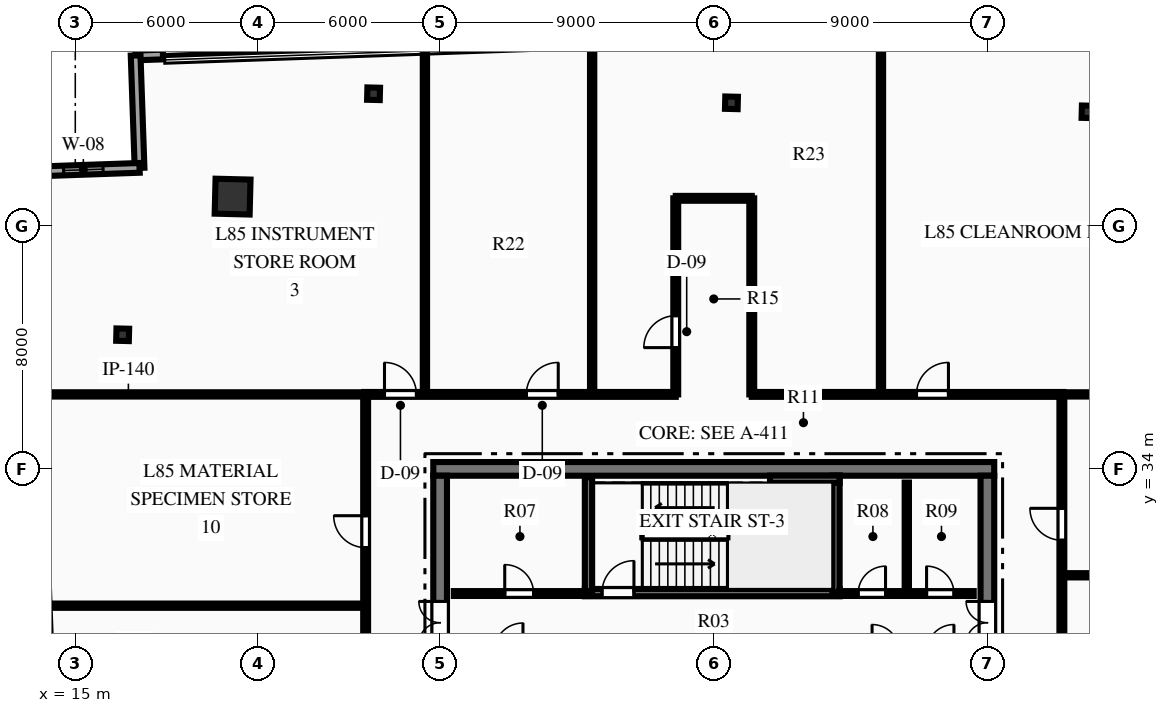
"""IFC4 building model, lengths in metres.
Left out: names, types, materials, properties, quantities, classifications, styles, units other than length and angle.
Written with IfcOpenShell. Run it as: python <this file> out.ifc"""

import sys

from ifc_helpers import new_model, si_unit, direction, frame, frame_2d, origin, origin_2d, place, context, subcontext, project, spatial, rectangle, hollow_rectangle, i_section, extrude, element, fill, save


model = new_model("IFC4")
c1 = context("Model", 3, precision=1e-05, world=origin(), true_north=direction((0.0, 1.0)))
c2 = subcontext(c1, "Body", "Model", "MODEL_VIEW")
j1 = project(units=[si_unit("LENGTHUNIT", "METRE"), si_unit("PLANEANGLEUNIT", "RADIAN")], contexts=[c1])
p1 = place(None, origin())
s1 = spatial("IfcSite", under=j1, at=p1, CompositionType="ELEMENT")
p2 = place(p1, origin())
s2 = spatial("IfcBuilding", under=s1, at=p2, CompositionType="ELEMENT")
p3 = place(p2, frame((0.0, 0.0, 336.45)))
s3 = spatial("IfcBuildingStorey", under=s2, at=p3, CompositionType="ELEMENT", Elevation=336.45)
p4 = place(p3, frame((26.775, 34.0, 0.0), z_axis=(0.0, 0.0, 1.0), x_axis=(1.0, 0.0, 0.0)))
e1 = element("IfcWall", 1, at=p4, inside=s3, PredefinedType="SHEAR", context=c2, shape_type="SweptSolid", body=[
    extrude(rectangle(XDim=18.45, YDim=0.45, at=frame_2d((9.225, 0.0))), origin(), (0.0, 0.0, 1.0), 3.75),
])
p5 = place(p3, frame((27.0, 18.225, 0.0), z_axis=(0.0, 0.0, 1.0), x_axis=(0.0, 1.0, 0.0)))
e2 = element("IfcWall", 2, at=p5, inside=s3, PredefinedType="SHEAR", context=c2, shape_type="SweptSolid", body=[
    extrude(rectangle(XDim=15.55, YDim=0.45, at=frame_2d((7.775, 0.0))), origin(), (0.0, 0.0, 1.0), 3.75),
])
p6 = place(p5, frame((10.015, 0.0, 0.0)))
e3 = element("IfcOpeningElement", 3, at=p6, cuts=e2, PredefinedType="OPENING", context=c2, shape_type="SweptSolid", body=[
    extrude(rectangle(XDim=1.4, YDim=2.2, at=frame_2d((0.7, 1.1))), frame((0.0, 0.235, 0.0), z_axis=(0.0, -1.0, 0.0), x_axis=(1.0, 0.0, 0.0)), (0.0, 0.0, 1.0), 0.47),
])
p7 = place(p3, frame((45.0, 18.225, 0.0), z_axis=(0.0, 0.0, 1.0), x_axis=(0.0, 1.0, 0.0)))
e4 = element("IfcWall", 4, at=p7, inside=s3, PredefinedType="SHEAR", context=c2, shape_type="SweptSolid", body=[
    extrude(rectangle(XDim=15.55, YDim=0.45, at=frame_2d((7.775, 0.0))), origin(), (0.0, 0.0, 1.0), 3.75),
])
p8 = place(p7, frame((10.015, 0.0, 0.0)))
e5 = element("IfcOpeningElement", 5, at=p8, cuts=e4, PredefinedType="OPENING", context=c2, shape_type="SweptSolid", body=[
    extrude(rectangle(XDim=1.4, YDim=2.2, at=frame_2d((0.7, 1.1))), frame((0.0, 0.235, 0.0), z_axis=(0.0, -1.0, 0.0), x_axis=(1.0, 0.0, 0.0)), (0.0, 0.0, 1.0), 0.47),
])
p9 = place(p3, frame((31.76, 29.93, 0.0), z_axis=(0.0, 0.0, 1.0), x_axis=(1.0, 0.0, 0.0)))
e6 = element("IfcWall", 6, at=p9, inside=s3, PredefinedType="SHEAR", context=c2, shape_type="SweptSolid", body=[
    extrude(rectangle(XDim=8.38, YDim=0.24, at=frame_2d((4.19, 0.0))), origin(), (0.0, 0.0, 1.0), 3.75),
])
p10 = place(p9, frame((0.565, 0.0, 0.0)))
e7 = element("IfcOpeningElement", 7, at=p10, cuts=e6, PredefinedType="OPENING", context=c2, shape_type="SweptSolid", body=[
    extrude(rectangle(XDim=1.05, YDim=2.15, at=frame_2d((0.525, 1.075))), frame((0.0, 0.13, 0.0), z_axis=(0.0, -1.0, 0.0), x_axis=(1.0, 0.0, 0.0)), (0.0, 0.0, 1.0), 0.26),
])
p11 = place(p3, frame((31.88, 29.93, 0.0), z_axis=(0.0, 0.0, 1.0), x_axis=(0.0, 1.0, 0.0)))
e8 = element("IfcWall", 8, at=p11, inside=s3, PredefinedType="SHEAR", context=c2, shape_type="SweptSolid", body=[
    extrude(rectangle(XDim=3.79, YDim=0.24, at=frame_2d((1.895, 0.0))), origin(), (0.0, 0.0, 1.0), 3.75),
])
p12 = place(p3, frame((40.02, 29.93, 0.0), z_axis=(0.0, 0.0, 1.0), x_axis=(0.0, 1.0, 0.0)))
e9 = element("IfcWall", 9, at=p12, inside=s3, PredefinedType="SHEAR", context=c2, shape_type="SweptSolid", body=[
    extrude(rectangle(XDim=3.85, YDim=0.24, at=frame_2d((1.925, 0.0))), origin(), (0.0, 0.0, 1.0), 3.75),
])
p13 = place(p3, frame((37.85, 33.66, 0.0), z_axis=(0.0, 0.0, 1.0), x_axis=(1.0, 0.0, 0.0)))
e10 = element("IfcWall", 10, at=p13, inside=s3, PredefinedType="SHEAR", context=c2, shape_type="SweptSolid", body=[
    extrude(rectangle(XDim=2.29, YDim=0.24, at=frame_2d((1.145, 0.0))), origin(), (0.0, 0.0, 1.0), 3.75),
])
p14 = place(p3, frame((20.174, 42.956, 0.0), z_axis=(0.0, 0.0, 1.0), x_axis=(0.025304572866, 0.999679788028, 0.0)))
e11 = element("IfcColumn", 11, at=p14, inside=s3, PredefinedType="COLUMN", context=c2, shape_type="SweptSolid", body=[
    extrude(hollow_rectangle(XDim=1.15, YDim=1.15, WallThickness=0.05, at=origin_2d()), origin(), (0.0, 0.0, 1.0), 3.75),
])
for number, where, z_axis, x_axis in (
    (12, (48.312, 45.745, 0.0), (0.0, 0.0, 1.0), (0.025, 1.0, 0.0)),
    (13, (36.582, 46.042, 0.0), (0.0, 0.0, 1.0), (0.025, 1.0, 0.0)),
    (14, (24.811, 46.34, 0.0), (0.0, 0.0, 1.0), (0.025, 1.0, 0.0)),
    (15, (16.558, 38.412, 0.0), (0.0, 0.0, 1.0), (0.025, 1.0, 0.0)),
):
    element("IfcColumn", number, at=place(p3, frame(where, z_axis=z_axis, x_axis=x_axis)), inside=s3, PredefinedType="COLUMN", context=c2, shape_type="SweptSolid", body=[
        extrude(i_section(OverallWidth=0.406, OverallDepth=0.416, WebThickness=0.03, FlangeThickness=0.048, at=origin_2d()), origin(), (0.0, 0.0, 1.0), 3.75),
    ])
p15 = place(p3, frame((16.985, 47.6, 0.0), z_axis=(0.0, 0.0, 1.0), x_axis=(0.999396943912, 0.034723889474, 0.0)))
e16 = element("IfcWall", 16, at=p15, inside=s3, PredefinedType="STANDARD", context=c2, shape_type="SweptSolid", body=[
    extrude(rectangle(XDim=0.9, YDim=0.32, at=frame_2d((0.45, 0.0))), origin(), (0.0, 0.0, 1.0), 3.49),
])
p16 = place(p3, frame((17.114, 43.902, 0.0), z_axis=(0.0, 0.0, 1.0), x_axis=(-0.034905429677, 0.999390619817, 0.0)))
e17 = element("IfcWall", 17, at=p16, inside=s3, PredefinedType="STANDARD", context=c2, shape_type="SweptSolid", body=[
    extrude(rectangle(XDim=3.7, YDim=0.32, at=frame_2d((1.85, 0.0))), origin(), (0.0, 0.0, 1.0), 3.49),
])
p17 = place(p3, frame((13.416, 43.773, 0.0), z_axis=(0.0, 0.0, 1.0), x_axis=(0.999390619817, 0.034905429677, 0.0)))
e18 = element("IfcWall", 18, at=p17, inside=s3, PredefinedType="STANDARD", context=c2, shape_type="SweptSolid", body=[
    extrude(rectangle(XDim=3.7, YDim=0.32, at=frame_2d((1.85, 0.0))), origin(), (0.0, 0.0, 1.0), 3.49),
])
p18 = place(p17, frame((1.2, 0.0, 0.85)))
e19 = element("IfcOpeningElement", 19, at=p18, cuts=e18, PredefinedType="OPENING", context=c2, shape_type="SweptSolid", body=[
    extrude(rectangle(XDim=1.3, YDim=1.9, at=frame_2d((0.65, 0.95))), frame((0.0, 0.17, 0.0), z_axis=(0.0, -1.0, 0.0), x_axis=(1.0, 0.0, 0.0)), (0.0, 0.0, 1.0), 0.34),
])
p19 = place(p3, frame((27.45, 29.9, 0.0), z_axis=(0.0, 0.0, 1.0), x_axis=(1.0, 0.0, 0.0)))
e20 = element("IfcWall", 20, at=p19, inside=s3, PredefinedType="PARTITIONING", context=c2, shape_type="SweptSolid", body=[
    extrude(rectangle(XDim=4.43, YDim=0.16, at=frame_2d((2.215, 0.0))), origin(), (0.0, 0.0, 1.0), 3.49),
])
p20 = place(p19, frame((1.675, 0.0, 0.0)))
e21 = element("IfcOpeningElement", 21, at=p20, cuts=e20, PredefinedType="OPENING", context=c2, shape_type="SweptSolid", body=[
    extrude(rectangle(XDim=0.95, YDim=2.15, at=frame_2d((0.475, 1.075))), frame((0.0, 0.09, 0.0), z_axis=(0.0, -1.0, 0.0), x_axis=(1.0, 0.0, 0.0)), (0.0, 0.0, 1.0), 0.18),
])
p21 = place(p3, frame((40.12, 29.9, 0.0), z_axis=(0.0, 0.0, 1.0), x_axis=(1.0, 0.0, 0.0)))
e22 = element("IfcWall", 22, at=p21, inside=s3, PredefinedType="PARTITIONING", context=c2, shape_type="SweptSolid", body=[
    extrude(rectangle(XDim=4.43, YDim=0.16, at=frame_2d((2.215, 0.0))), origin(), (0.0, 0.0, 1.0), 3.49),
])
p22 = place(p21, frame((0.63, 0.0, 0.0)))
e23 = element("IfcOpeningElement", 23, at=p22, cuts=e22, PredefinedType="OPENING", context=c2, shape_type="SweptSolid", body=[
    extrude(rectangle(XDim=0.9, YDim=2.15, at=frame_2d((0.45, 1.075))), frame((0.0, 0.09, 0.0), z_axis=(0.0, -1.0, 0.0), x_axis=(1.0, 0.0, 0.0)), (0.0, 0.0, 1.0), 0.18),
])
p23 = place(p21, frame((2.88, 0.0, 0.0)))
e24 = element("IfcOpeningElement", 24, at=p23, cuts=e22, PredefinedType="OPENING", context=c2, shape_type="SweptSolid", body=[
    extrude(rectangle(XDim=0.9, YDim=2.15, at=frame_2d((0.45, 1.075))), frame((0.0, 0.09, 0.0), z_axis=(0.0, -1.0, 0.0), x_axis=(1.0, 0.0, 0.0)), (0.0, 0.0, 1.0), 0.18),
])
p24 = place(p3, frame((42.35, 29.95, 0.0), z_axis=(0.0, 0.0, 1.0), x_axis=(0.0, 1.0, 0.0)))
e25 = element("IfcWall", 25, at=p24, inside=s3, PredefinedType="PARTITIONING", context=c2, shape_type="SweptSolid", body=[
    extrude(rectangle(XDim=3.6, YDim=0.14, at=frame_2d((1.8, 0.0))), origin(), (0.0, 0.0, 1.0), 3.49),
])
p25 = place(p3, frame((24.5, 36.45, 0.0), z_axis=(0.0, 0.0, 1.0), x_axis=(1.0, 0.0, 0.0)))
e26 = element("IfcWall", 26, at=p25, inside=s3, PredefinedType="PARTITIONING", context=c2, shape_type="SweptSolid", body=[
    extrude(rectangle(XDim=10.25, YDim=0.16, at=frame_2d((5.125, 0.0))), origin(), (0.0, 0.0, 1.0), 3.49),
])
p26 = place(p25, frame((0.67, 0.0, 0.0)))
e27 = element("IfcOpeningElement", 27, at=p26, cuts=e26, PredefinedType="OPENING", context=c2, shape_type="SweptSolid", body=[
    extrude(rectangle(XDim=1.05, YDim=2.15, at=frame_2d((0.525, 1.075))), frame((0.0, 0.09, 0.0), z_axis=(0.0, -1.0, 0.0), x_axis=(1.0, 0.0, 0.0)), (0.0, 0.0, 1.0), 0.18),
])
p27 = place(p25, frame((5.335, 0.0, 0.0)))
e28 = element("IfcOpeningElement", 28, at=p27, cuts=e26, PredefinedType="OPENING", context=c2, shape_type="SweptSolid", body=[
    extrude(rectangle(XDim=1.05, YDim=2.15, at=frame_2d((0.525, 1.075))), frame((0.0, 0.09, 0.0), z_axis=(0.0, -1.0, 0.0), x_axis=(1.0, 0.0, 0.0)), (0.0, 0.0, 1.0), 0.18),
])
p28 = place(p3, frame((37.25, 36.45, 0.0), z_axis=(0.0, 0.0, 1.0), x_axis=(1.0, 0.0, 0.0)))
e29 = element("IfcWall", 29, at=p28, inside=s3, PredefinedType="PARTITIONING", context=c2, shape_type="SweptSolid", body=[
    extrude(rectangle(XDim=10.25, YDim=0.16, at=frame_2d((5.125, 0.0))), origin(), (0.0, 0.0, 1.0), 3.49),
])
p29 = place(p28, frame((5.419, 0.0, 0.0)))
e30 = element("IfcOpeningElement", 30, at=p29, cuts=e29, PredefinedType="OPENING", context=c2, shape_type="SweptSolid", body=[
    extrude(rectangle(XDim=1.05, YDim=2.15, at=frame_2d((0.525, 1.075))), frame((0.0, 0.09, 0.0), z_axis=(0.0, -1.0, 0.0), x_axis=(1.0, 0.0, 0.0)), (0.0, 0.0, 1.0), 0.18),
])
p30 = place(p3, frame((24.55, 27.25, 0.0), z_axis=(0.0, 0.0, 1.0), x_axis=(0.0, 1.0, 0.0)))
e31 = element("IfcWall", 31, at=p30, inside=s3, PredefinedType="PARTITIONING", context=c2, shape_type="SweptSolid", body=[
    extrude(rectangle(XDim=9.2, YDim=0.16, at=frame_2d((4.6, 0.0))), origin(), (0.0, 0.0, 1.0), 3.49),
])
p31 = place(p30, frame((4.16, 0.0, 0.0)))
e32 = element("IfcOpeningElement", 32, at=p31, cuts=e31, PredefinedType="OPENING", context=c2, shape_type="SweptSolid", body=[
    extrude(rectangle(XDim=1.05, YDim=2.15, at=frame_2d((0.525, 1.075))), frame((0.0, 0.09, 0.0), z_axis=(0.0, -1.0, 0.0), x_axis=(1.0, 0.0, 0.0)), (0.0, 0.0, 1.0), 0.18),
])
p32 = place(p3, frame((47.45, 27.25, 0.0), z_axis=(0.0, 0.0, 1.0), x_axis=(0.0, 1.0, 0.0)))
e33 = element("IfcWall", 33, at=p32, inside=s3, PredefinedType="PARTITIONING", context=c2, shape_type="SweptSolid", body=[
    extrude(rectangle(XDim=9.2, YDim=0.16, at=frame_2d((4.6, 0.0))), origin(), (0.0, 0.0, 1.0), 3.49),
])
p33 = place(p32, frame((4.403, 0.0, 0.0)))
e34 = element("IfcOpeningElement", 34, at=p33, cuts=e33, PredefinedType="OPENING", context=c2, shape_type="SweptSolid", body=[
    extrude(rectangle(XDim=1.05, YDim=2.15, at=frame_2d((0.525, 1.075))), frame((0.0, 0.09, 0.0), z_axis=(0.0, -1.0, 0.0), x_axis=(1.0, 0.0, 0.0)), (0.0, 0.0, 1.0), 0.18),
])
p34 = place(p3, frame((34.75, 36.45, 0.0), z_axis=(0.0, 0.0, 1.0), x_axis=(0.0, 1.0, 0.0)))
e35 = element("IfcWall", 35, at=p34, inside=s3, PredefinedType="PARTITIONING", context=c2, shape_type="SweptSolid", body=[
    extrude(rectangle(XDim=6.45, YDim=0.16, at=frame_2d((3.225, 0.0))), origin(), (0.0, 0.0, 1.0), 3.49),
])
p35 = place(p34, frame((1.539, 0.0, 0.0)))
e36 = element("IfcOpeningElement", 36, at=p35, cuts=e35, PredefinedType="OPENING", context=c2, shape_type="SweptSolid", body=[
    extrude(rectangle(XDim=1.05, YDim=2.15, at=frame_2d((0.525, 1.075))), frame((0.0, 0.09, 0.0), z_axis=(0.0, -1.0, 0.0), x_axis=(1.0, 0.0, 0.0)), (0.0, 0.0, 1.0), 0.18),
])
p36 = place(p3, frame((37.25, 36.45, 0.0), z_axis=(0.0, 0.0, 1.0), x_axis=(0.0, 1.0, 0.0)))
e37 = element("IfcWall", 37, at=p36, inside=s3, PredefinedType="PARTITIONING", context=c2, shape_type="SweptSolid", body=[
    extrude(rectangle(XDim=6.45, YDim=0.16, at=frame_2d((3.225, 0.0))), origin(), (0.0, 0.0, 1.0), 3.49),
])
p37 = place(p3, frame((34.75, 42.9, 0.0), z_axis=(0.0, 0.0, 1.0), x_axis=(1.0, 0.0, 0.0)))
e38 = element("IfcWall", 38, at=p37, inside=s3, PredefinedType="PARTITIONING", context=c2, shape_type="SweptSolid", body=[
    extrude(rectangle(XDim=2.5, YDim=0.16, at=frame_2d((1.25, 0.0))), origin(), (0.0, 0.0, 1.0), 3.49),
])
p38 = place(p3, frame((13.712, 36.45, 0.0), z_axis=(0.0, 0.0, 1.0), x_axis=(1.0, 0.0, 0.0)))
e39 = element("IfcWall", 39, at=p38, inside=s3, PredefinedType="PARTITIONING", context=c2, shape_type="SweptSolid", body=[
    extrude(rectangle(XDim=10.838, YDim=0.14, at=frame_2d((5.419, 0.0))), origin(), (0.0, 0.0, 1.0), 2.868),
])
p39 = place(p3, frame((47.45, 36.45, 0.0), z_axis=(0.0, 0.0, 1.0), x_axis=(1.0, 0.0, 0.0)))
e40 = element("IfcWall", 40, at=p39, inside=s3, PredefinedType="PARTITIONING", context=c2, shape_type="SweptSolid", body=[
    extrude(rectangle(XDim=10.283, YDim=0.14, at=frame_2d((5.142, 0.0))), origin(), (0.0, 0.0, 1.0), 2.868),
])
p40 = place(p3, frame((26.5, 36.45, 0.0), z_axis=(0.0, 0.0, 1.0), x_axis=(0.0, 1.0, 0.0)))
e41 = element("IfcWall", 41, at=p40, inside=s3, PredefinedType="PARTITIONING", context=c2, shape_type="SweptSolid", body=[
    extrude(rectangle(XDim=11.442, YDim=0.14, at=frame_2d((5.721, 0.0))), origin(), (0.0, 0.0, 1.0), 2.868),
])
p41 = place(p3, frame((32.0, 36.45, 0.0), z_axis=(0.0, 0.0, 1.0), x_axis=(0.0, 1.0, 0.0)))
e42 = element("IfcWall", 42, at=p41, inside=s3, PredefinedType="PARTITIONING", context=c2, shape_type="SweptSolid", body=[
    extrude(rectangle(XDim=11.634, YDim=0.14, at=frame_2d((5.817, 0.0))), origin(), (0.0, 0.0, 1.0), 3.49),
])
p42 = place(p3, frame((41.5, 36.45, 0.0), z_axis=(0.0, 0.0, 1.0), x_axis=(0.0, 1.0, 0.0)))
e43 = element("IfcWall", 43, at=p42, inside=s3, PredefinedType="PARTITIONING", context=c2, shape_type="SweptSolid", body=[
    extrude(rectangle(XDim=11.966, YDim=0.14, at=frame_2d((5.983, 0.0))), origin(), (0.0, 0.0, 1.0), 3.49),
])
p43 = place(p3, frame((13.954, 29.5, 0.0), z_axis=(0.0, 0.0, 1.0), x_axis=(1.0, 0.0, 0.0)))
e44 = element("IfcWall", 44, at=p43, inside=s3, PredefinedType="PARTITIONING", context=c2, shape_type="SweptSolid", body=[
    extrude(rectangle(XDim=10.596, YDim=0.14, at=frame_2d((5.298, 0.0))), origin(), (0.0, 0.0, 1.0), 3.49),
])
p44 = place(p3, frame((47.45, 30.5, 0.0), z_axis=(0.0, 0.0, 1.0), x_axis=(1.0, 0.0, 0.0)))
e45 = element("IfcWall", 45, at=p44, inside=s3, PredefinedType="PARTITIONING", context=c2, shape_type="SweptSolid", body=[
    extrude(rectangle(XDim=10.491, YDim=0.14, at=frame_2d((5.246, 0.0))), origin(), (0.0, 0.0, 1.0), 3.49),
])
p45 = place(p18, origin())
e46 = element("IfcWindow", 46, at=p45, inside=s3, PartitioningType="SINGLE_PANEL", PredefinedType="WINDOW", context=c2, shape_type="SweptSolid", body=[
    extrude(rectangle(XDim=1.3, YDim=1.9, at=frame_2d((0.65, 0.95))), frame((0.0, 0.03, 0.0), z_axis=(0.0, -1.0, 0.0), x_axis=(1.0, 0.0, 0.0)), (0.0, 0.0, 1.0), 0.06),
])
fill(e19, e46)
p46 = place(p20, origin())
e47 = element("IfcDoor", 47, at=p46, inside=s3, OperationType="SINGLE_SWING_LEFT", PredefinedType="DOOR", context=c2, shape_type="SweptSolid", body=[
    extrude(rectangle(XDim=0.95, YDim=2.15, at=frame_2d((0.475, 1.075))), frame((0.0, 0.025, 0.0), z_axis=(0.0, -1.0, 0.0), x_axis=(1.0, 0.0, 0.0)), (0.0, 0.0, 1.0), 0.05),
])
fill(e21, e47)
p47 = place(p22, origin())
e48 = element("IfcDoor", 48, at=p47, inside=s3, OperationType="SINGLE_SWING_RIGHT", PredefinedType="DOOR", context=c2, shape_type="SweptSolid", body=[
    extrude(rectangle(XDim=0.9, YDim=2.15, at=frame_2d((0.45, 1.075))), frame((0.0, 0.025, 0.0), z_axis=(0.0, -1.0, 0.0), x_axis=(1.0, 0.0, 0.0)), (0.0, 0.0, 1.0), 0.05),
])
fill(e23, e48)
p48 = place(p23, origin())
e49 = element("IfcDoor", 49, at=p48, inside=s3, OperationType="SINGLE_SWING_LEFT", PredefinedType="DOOR", context=c2, shape_type="SweptSolid", body=[
    extrude(rectangle(XDim=0.9, YDim=2.15, at=frame_2d((0.45, 1.075))), frame((0.0, 0.025, 0.0), z_axis=(0.0, -1.0, 0.0), x_axis=(1.0, 0.0, 0.0)), (0.0, 0.0, 1.0), 0.05),
])
fill(e24, e49)
p49 = place(p10, origin())
e50 = element("IfcDoor", 50, at=p49, inside=s3, OperationType="SINGLE_SWING_RIGHT", PredefinedType="DOOR", context=c2, shape_type="SweptSolid", body=[
    extrude(rectangle(XDim=1.05, YDim=2.15, at=frame_2d((0.525, 1.075))), frame((0.0, 0.025, 0.0), z_axis=(0.0, -1.0, 0.0), x_axis=(1.0, 0.0, 0.0)), (0.0, 0.0, 1.0), 0.05),
])
fill(e7, e50)
p50 = place(p6, origin())
e51 = element("IfcDoor", 51, at=p50, inside=s3, OperationType="DOUBLE_DOOR_SINGLE_SWING", PredefinedType="DOOR", context=c2, shape_type="SweptSolid", body=[
    extrude(rectangle(XDim=1.4, YDim=2.2, at=frame_2d((0.7, 1.1))), frame((0.0, 0.025, 0.0), z_axis=(0.0, -1.0, 0.0), x_axis=(1.0, 0.0, 0.0)), (0.0, 0.0, 1.0), 0.05),
])
fill(e3, e51)
p51 = place(p8, origin())
e52 = element("IfcDoor", 52, at=p51, inside=s3, OperationType="DOUBLE_DOOR_SINGLE_SWING", PredefinedType="DOOR", context=c2, shape_type="SweptSolid", body=[
    extrude(rectangle(XDim=1.4, YDim=2.2, at=frame_2d((0.7, 1.1))), frame((0.0, 0.025, 0.0), z_axis=(0.0, -1.0, 0.0), x_axis=(1.0, 0.0, 0.0)), (0.0, 0.0, 1.0), 0.05),
])
fill(e5, e52)
p52 = place(p26, origin())
e53 = element("IfcDoor", 53, at=p52, inside=s3, OperationType="SINGLE_SWING_LEFT", PredefinedType="DOOR", context=c2, shape_type="SweptSolid", body=[
    extrude(rectangle(XDim=1.05, YDim=2.15, at=frame_2d((0.525, 1.075))), frame((0.0, 0.025, 0.0), z_axis=(0.0, -1.0, 0.0), x_axis=(1.0, 0.0, 0.0)), (0.0, 0.0, 1.0), 0.05),
])
fill(e27, e53)
p53 = place(p27, origin())
e54 = element("IfcDoor", 54, at=p53, inside=s3, OperationType="SINGLE_SWING_RIGHT", PredefinedType="DOOR", context=c2, shape_type="SweptSolid", body=[
    extrude(rectangle(XDim=1.05, YDim=2.15, at=frame_2d((0.525, 1.075))), frame((0.0, 0.025, 0.0), z_axis=(0.0, -1.0, 0.0), x_axis=(1.0, 0.0, 0.0)), (0.0, 0.0, 1.0), 0.05),
])
fill(e28, e54)
p54 = place(p35, origin())
e55 = element("IfcDoor", 55, at=p54, inside=s3, OperationType="SINGLE_SWING_LEFT", PredefinedType="DOOR", context=c2, shape_type="SweptSolid", body=[
    extrude(rectangle(XDim=1.05, YDim=2.15, at=frame_2d((0.525, 1.075))), frame((0.0, 0.025, 0.0), z_axis=(0.0, -1.0, 0.0), x_axis=(1.0, 0.0, 0.0)), (0.0, 0.0, 1.0), 0.05),
])
fill(e36, e55)
p55 = place(p29, origin())
e56 = element("IfcDoor", 56, at=p55, inside=s3, OperationType="SINGLE_SWING_RIGHT", PredefinedType="DOOR", context=c2, shape_type="SweptSolid", body=[
    extrude(rectangle(XDim=1.05, YDim=2.15, at=frame_2d((0.525, 1.075))), frame((0.0, 0.025, 0.0), z_axis=(0.0, -1.0, 0.0), x_axis=(1.0, 0.0, 0.0)), (0.0, 0.0, 1.0), 0.05),
])
fill(e30, e56)
p56 = place(p31, origin())
e57 = element("IfcDoor", 57, at=p56, inside=s3, OperationType="SINGLE_SWING_RIGHT", PredefinedType="DOOR", context=c2, shape_type="SweptSolid", body=[
    extrude(rectangle(XDim=1.05, YDim=2.15, at=frame_2d((0.525, 1.075))), frame((0.0, 0.025, 0.0), z_axis=(0.0, -1.0, 0.0), x_axis=(1.0, 0.0, 0.0)), (0.0, 0.0, 1.0), 0.05),
])
fill(e32, e57)
p57 = place(p33, origin())
e58 = element("IfcDoor", 58, at=p57, inside=s3, OperationType="SINGLE_SWING_RIGHT", PredefinedType="DOOR", context=c2, shape_type="SweptSolid", body=[
    extrude(rectangle(XDim=1.05, YDim=2.15, at=frame_2d((0.525, 1.075))), frame((0.0, 0.025, 0.0), z_axis=(0.0, -1.0, 0.0), x_axis=(1.0, 0.0, 0.0)), (0.0, 0.0, 1.0), 0.05),
])
fill(e34, e58)
save(model, sys.argv[1])
